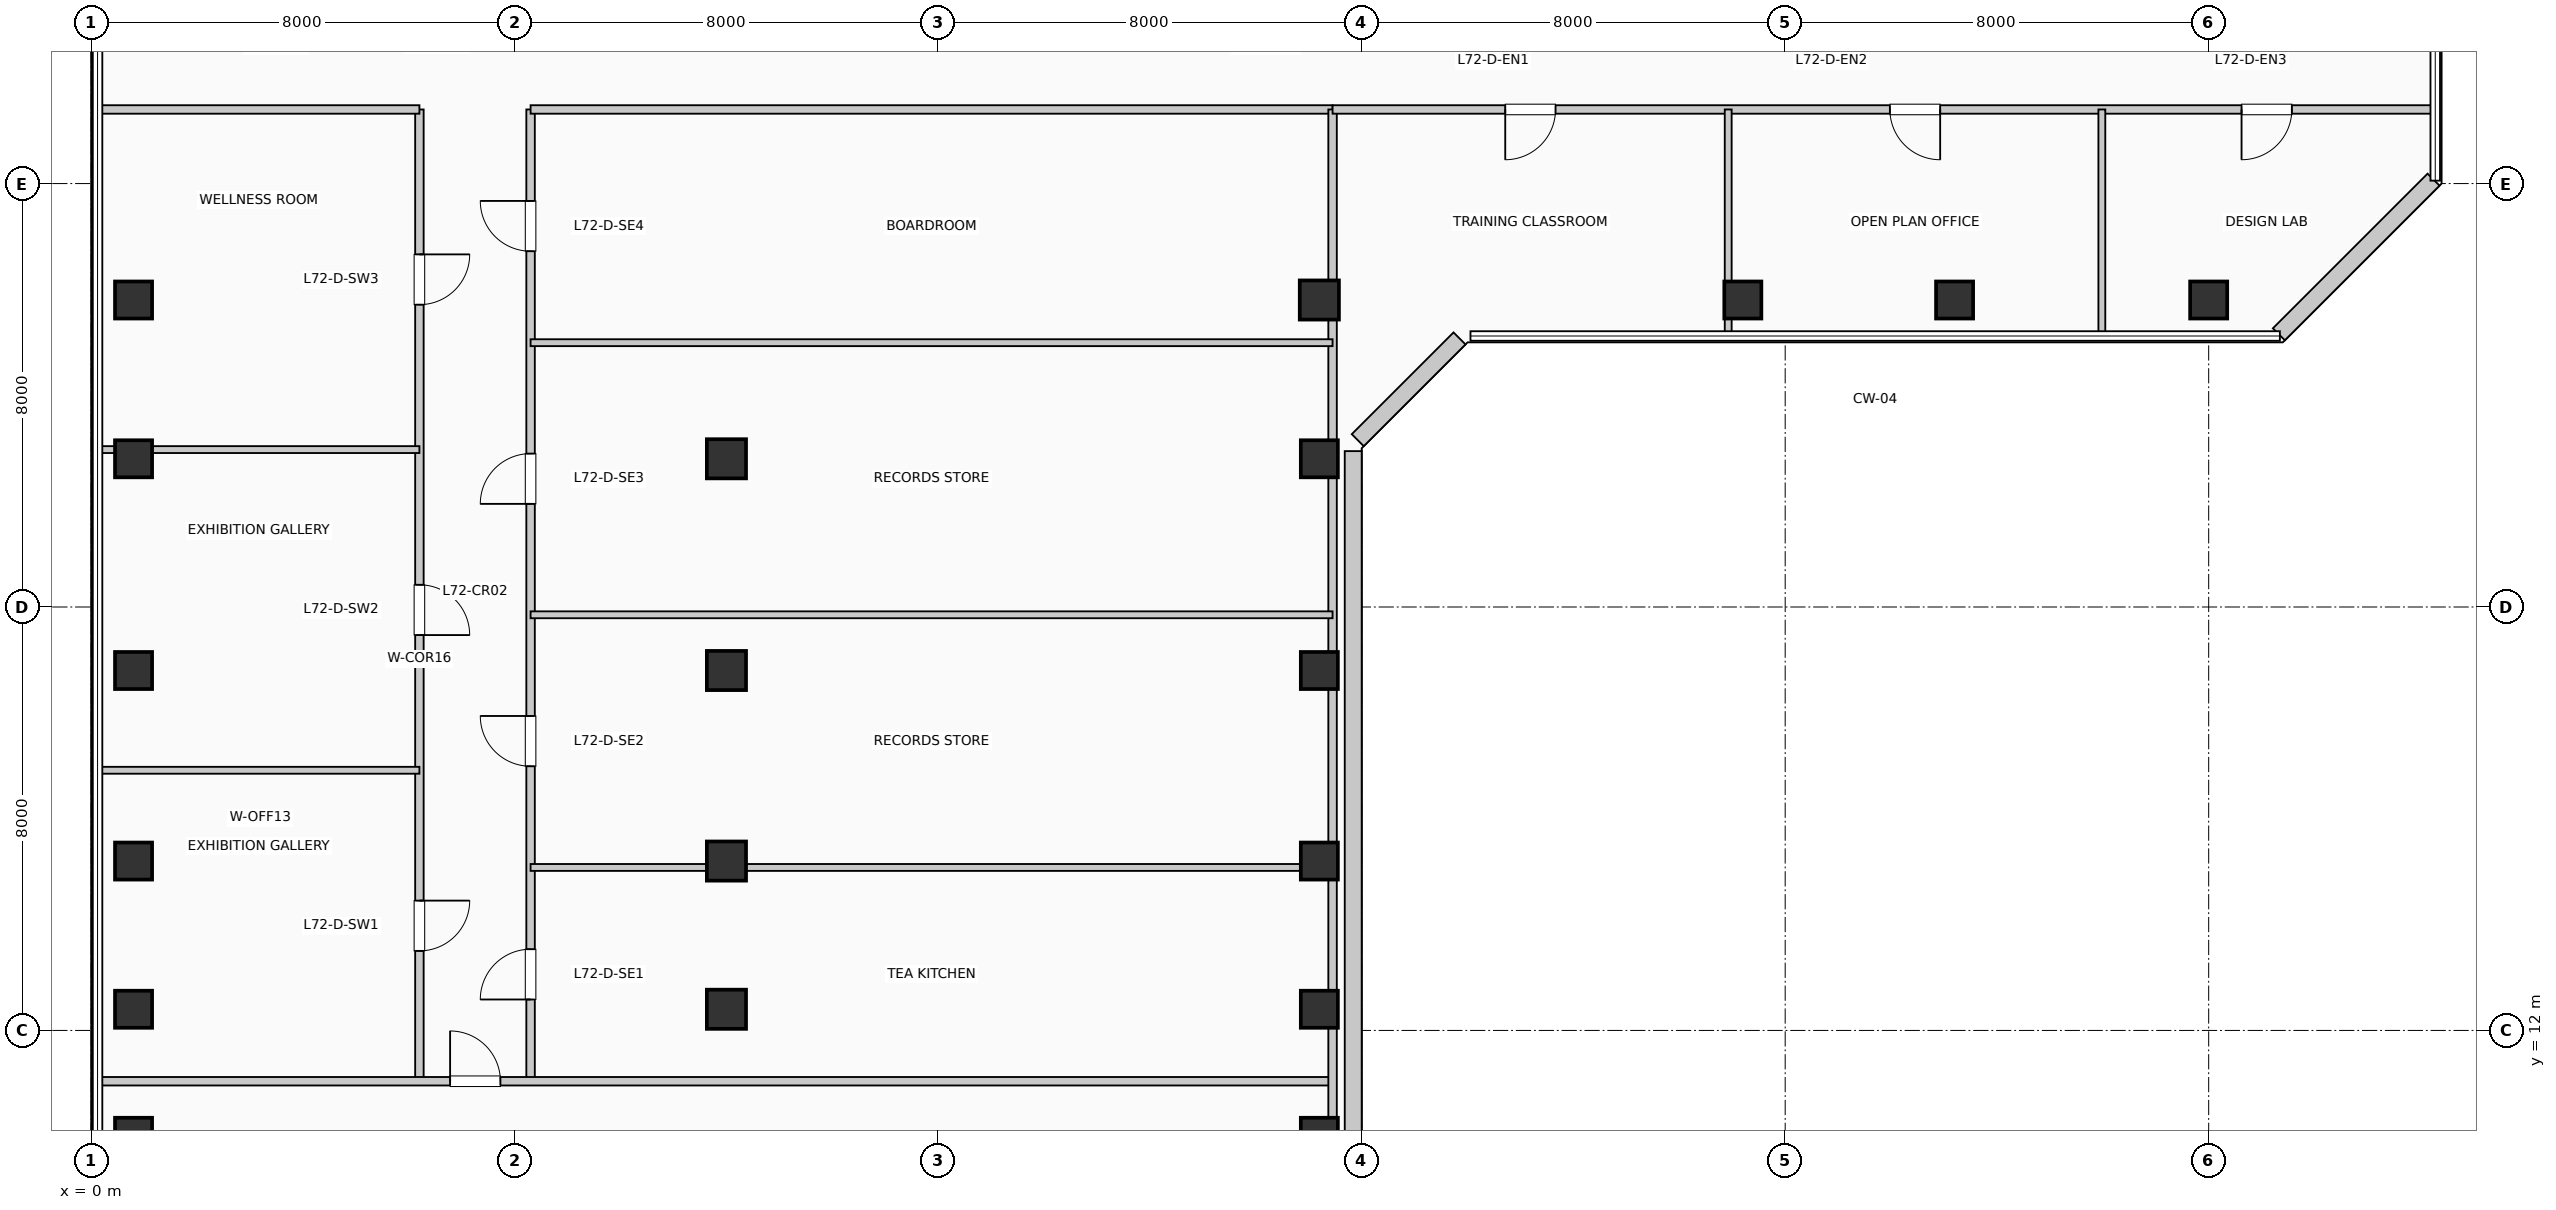
"""IFC4 building model, lengths in metres.
Left out: names, types, materials, properties, quantities, classifications, styles, units other than length and angle.
Written with IfcOpenShell. Run it as: python <this file> out.ifc"""

import sys

from ifc_helpers import new_model, si_unit, direction, frame, frame_2d, origin, origin_2d, place, context, subcontext, project, spatial, rectangle, extrude, element, fill, save


model = new_model("IFC4")
c1 = context("Model", 3, precision=1e-05, world=origin(), true_north=direction((0.0, 1.0)))
c2 = subcontext(c1, "Body", "Model", "MODEL_VIEW")
j1 = project(units=[si_unit("LENGTHUNIT", "METRE"), si_unit("PLANEANGLEUNIT", "RADIAN")], contexts=[c1])
p1 = place(None, origin())
s1 = spatial("IfcSite", under=j1, at=p1, CompositionType="ELEMENT")
p2 = place(p1, origin())
s2 = spatial("IfcBuilding", under=s1, at=p2, CompositionType="ELEMENT")
p3 = place(p2, frame((0.0, 0.0, 296.01)))
s3 = spatial("IfcBuildingStorey", under=s2, at=p3, CompositionType="ELEMENT", Elevation=296.01)
for number, where, z_axis, x_axis in (
    (1, (0.8, 10.0, 0.0), (0.0, 0.0, 1.0), (1.0, 0.0, 0.0)),
    (2, (0.8, 12.4, 0.0), (0.0, 0.0, 1.0), (1.0, 0.0, 0.0)),
    (3, (0.8, 15.2, 0.0), (0.0, 0.0, 1.0), (1.0, 0.0, 0.0)),
    (4, (0.8, 18.8, 0.0), (0.0, 0.0, 1.0), (1.0, 0.0, 0.0)),
    (5, (0.8, 22.8, 0.0), (0.0, 0.0, 1.0), (1.0, 0.0, 0.0)),
    (6, (0.8, 25.8, 0.0), (0.0, 0.0, 1.0), (1.0, 0.0, 0.0)),
):
    element("IfcColumn", number, at=place(p3, frame(where, z_axis=z_axis, x_axis=x_axis)), inside=s3, PredefinedType="COLUMN", context=c2, shape_type="SweptSolid", body=[
        extrude(rectangle(XDim=0.7, YDim=0.7, at=origin_2d()), origin(), (0.0, 0.0, 1.0), 3.96),
    ])
for number, where, z_axis, x_axis in (
    (7, (12.0, 12.4, 0.0), (0.0, 0.0, 1.0), (1.0, 0.0, 0.0)),
    (8, (12.0, 15.2, 0.0), (0.0, 0.0, 1.0), (1.0, 0.0, 0.0)),
    (9, (12.0, 18.8, 0.0), (0.0, 0.0, 1.0), (1.0, 0.0, 0.0)),
    (10, (12.0, 22.8, 0.0), (0.0, 0.0, 1.0), (1.0, 0.0, 0.0)),
):
    element("IfcColumn", number, at=place(p3, frame(where, z_axis=z_axis, x_axis=x_axis)), inside=s3, PredefinedType="COLUMN", context=c2, shape_type="SweptSolid", body=[
        extrude(rectangle(XDim=0.74, YDim=0.74, at=origin_2d()), origin(), (0.0, 0.0, 1.0), 3.96),
    ])
for number, where, z_axis, x_axis in (
    (11, (23.2, 10.0, 0.0), (0.0, 0.0, 1.0), (1.0, 0.0, 0.0)),
    (12, (23.2, 12.4, 0.0), (0.0, 0.0, 1.0), (1.0, 0.0, 0.0)),
    (13, (23.2, 15.2, 0.0), (0.0, 0.0, 1.0), (1.0, 0.0, 0.0)),
    (14, (23.2, 18.8, 0.0), (0.0, 0.0, 1.0), (1.0, 0.0, 0.0)),
    (15, (23.2, 22.8, 0.0), (0.0, 0.0, 1.0), (1.0, 0.0, 0.0)),
):
    element("IfcColumn", number, at=place(p3, frame(where, z_axis=z_axis, x_axis=x_axis)), inside=s3, PredefinedType="COLUMN", context=c2, shape_type="SweptSolid", body=[
        extrude(rectangle(XDim=0.7, YDim=0.7, at=origin_2d()), origin(), (0.0, 0.0, 1.0), 3.96),
    ])
p4 = place(p3, frame((23.2, 25.8, 0.0), z_axis=(0.0, 0.0, 1.0), x_axis=(1.0, 0.0, 0.0)))
e16 = element("IfcColumn", 16, at=p4, inside=s3, PredefinedType="COLUMN", context=c2, shape_type="SweptSolid", body=[
    extrude(rectangle(XDim=0.74, YDim=0.74, at=origin_2d()), origin(), (0.0, 0.0, 1.0), 3.96),
])
for number, where, z_axis, x_axis in (
    (17, (31.2, 25.8, 0.0), (0.0, 0.0, 1.0), (1.0, 0.0, 0.0)),
    (18, (35.2, 25.8, 0.0), (0.0, 0.0, 1.0), (1.0, 0.0, 0.0)),
    (19, (40.0, 25.8, 0.0), (0.0, 0.0, 1.0), (1.0, 0.0, 0.0)),
):
    element("IfcColumn", number, at=place(p3, frame(where, z_axis=z_axis, x_axis=x_axis)), inside=s3, PredefinedType="COLUMN", context=c2, shape_type="SweptSolid", body=[
        extrude(rectangle(XDim=0.7, YDim=0.7, at=origin_2d()), origin(), (0.0, 0.0, 1.0), 3.96),
    ])
p5 = place(p3, frame((23.84, 8.855, 0.0), z_axis=(0.0, 0.0, 1.0), x_axis=(0.0, 1.0, 0.0)))
e20 = element("IfcWall", 20, at=p5, inside=s3, PredefinedType="SOLIDWALL", context=c2, shape_type="SweptSolid", body=[
    extrude(rectangle(XDim=14.09, YDim=0.32, at=frame_2d((7.045, 0.0))), origin(), (0.0, 0.0, 1.0), 3.74),
])
p6 = place(p3, frame((23.926, 23.152, 0.0), z_axis=(0.0, 0.0, 1.0), x_axis=(0.707106781187, 0.707106781187, 0.0)))
e21 = element("IfcWall", 21, at=p6, inside=s3, PredefinedType="SOLIDWALL", context=c2, shape_type="SweptSolid", body=[
    extrude(rectangle(XDim=2.718, YDim=0.32, at=frame_2d((1.359, 0.0))), origin(), (0.0, 0.0, 1.0), 3.74),
])
p7 = place(p3, frame((41.326, 25.152, 0.0), z_axis=(0.0, 0.0, 1.0), x_axis=(0.707136318428, 0.707077242712, 0.0)))
e22 = element("IfcWall", 22, at=p7, inside=s3, PredefinedType="SOLIDWALL", context=c2, shape_type="SweptSolid", body=[
    extrude(rectangle(XDim=4.133, YDim=0.32, at=frame_2d((2.066, 0.0))), origin(), (0.0, 0.0, 1.0), 3.74),
])
p8 = place(p3, frame((6.2, 11.04, 0.0), z_axis=(0.0, 0.0, 1.0), x_axis=(0.0, 1.0, 0.0)))
e23 = element("IfcWall", 23, at=p8, inside=s3, PredefinedType="PARTITIONING", context=c2, shape_type="SweptSolid", body=[
    extrude(rectangle(XDim=18.36, YDim=0.16, at=frame_2d((9.18, 0.0))), origin(), (0.0, 0.0, 1.0), 3.74),
])
p9 = place(p8, frame((3.413, 0.0, 0.0), z_axis=(0.0, 0.0, 1.0), x_axis=(-1.0, 0.0, 0.0)))
e24 = element("IfcOpeningElement", 24, at=p9, cuts=e23, PredefinedType="OPENING", context=c2, shape_type="SweptSolid", body=[
    extrude(rectangle(XDim=0.95, YDim=2.15, at=frame_2d((0.475, 1.075))), frame((0.0, 0.09, 0.0), z_axis=(0.0, -1.0, 0.0), x_axis=(1.0, 0.0, 0.0)), (0.0, 0.0, 1.0), 0.18),
])
p10 = place(p8, frame((9.38, 0.0, 0.0), z_axis=(0.0, 0.0, 1.0), x_axis=(-1.0, 0.0, 0.0)))
e25 = element("IfcOpeningElement", 25, at=p10, cuts=e23, PredefinedType="OPENING", context=c2, shape_type="SweptSolid", body=[
    extrude(rectangle(XDim=0.95, YDim=2.15, at=frame_2d((0.475, 1.075))), frame((0.0, 0.09, 0.0), z_axis=(0.0, -1.0, 0.0), x_axis=(1.0, 0.0, 0.0)), (0.0, 0.0, 1.0), 0.18),
])
p11 = place(p8, frame((15.622, 0.0, 0.0), z_axis=(0.0, 0.0, 1.0), x_axis=(-1.0, 0.0, 0.0)))
e26 = element("IfcOpeningElement", 26, at=p11, cuts=e23, PredefinedType="OPENING", context=c2, shape_type="SweptSolid", body=[
    extrude(rectangle(XDim=0.95, YDim=2.15, at=frame_2d((0.475, 1.075))), frame((0.0, 0.09, 0.0), z_axis=(0.0, -1.0, 0.0), x_axis=(1.0, 0.0, 0.0)), (0.0, 0.0, 1.0), 0.18),
])
p12 = place(p3, frame((8.3, 11.04, 0.0), z_axis=(0.0, 0.0, 1.0), x_axis=(0.0, 1.0, 0.0)))
e27 = element("IfcWall", 27, at=p12, inside=s3, PredefinedType="PARTITIONING", context=c2, shape_type="SweptSolid", body=[
    extrude(rectangle(XDim=18.36, YDim=0.16, at=frame_2d((9.18, 0.0))), origin(), (0.0, 0.0, 1.0), 3.74),
])
p13 = place(p12, frame((1.545, 0.0, 0.0)))
e28 = element("IfcOpeningElement", 28, at=p13, cuts=e27, PredefinedType="OPENING", context=c2, shape_type="SweptSolid", body=[
    extrude(rectangle(XDim=0.95, YDim=2.15, at=frame_2d((0.475, 1.075))), frame((0.0, 0.09, 0.0), z_axis=(0.0, -1.0, 0.0), x_axis=(1.0, 0.0, 0.0)), (0.0, 0.0, 1.0), 0.18),
])
p14 = place(p12, frame((5.951, 0.0, 0.0)))
e29 = element("IfcOpeningElement", 29, at=p14, cuts=e27, PredefinedType="OPENING", context=c2, shape_type="SweptSolid", body=[
    extrude(rectangle(XDim=0.95, YDim=2.15, at=frame_2d((0.475, 1.075))), frame((0.0, 0.09, 0.0), z_axis=(0.0, -1.0, 0.0), x_axis=(1.0, 0.0, 0.0)), (0.0, 0.0, 1.0), 0.18),
])
p15 = place(p12, frame((10.908, 0.0, 0.0)))
e30 = element("IfcOpeningElement", 30, at=p15, cuts=e27, PredefinedType="OPENING", context=c2, shape_type="SweptSolid", body=[
    extrude(rectangle(XDim=0.95, YDim=2.15, at=frame_2d((0.475, 1.075))), frame((0.0, 0.09, 0.0), z_axis=(0.0, -1.0, 0.0), x_axis=(1.0, 0.0, 0.0)), (0.0, 0.0, 1.0), 0.18),
])
p16 = place(p12, frame((15.682, 0.0, 0.0)))
e31 = element("IfcOpeningElement", 31, at=p16, cuts=e27, PredefinedType="OPENING", context=c2, shape_type="SweptSolid", body=[
    extrude(rectangle(XDim=0.95, YDim=2.15, at=frame_2d((0.475, 1.075))), frame((0.0, 0.09, 0.0), z_axis=(0.0, -1.0, 0.0), x_axis=(1.0, 0.0, 0.0)), (0.0, 0.0, 1.0), 0.18),
])
p17 = place(p3, frame((0.19, 11.04, 0.0), z_axis=(0.0, 0.0, 1.0), x_axis=(1.0, 0.0, 0.0)))
e32 = element("IfcWall", 32, at=p17, inside=s3, PredefinedType="PARTITIONING", context=c2, shape_type="SweptSolid", body=[
    extrude(rectangle(XDim=23.26, YDim=0.16, at=frame_2d((11.63, 0.0))), origin(), (0.0, 0.0, 1.0), 3.74),
])
p18 = place(p17, frame((6.59, 0.0, 0.0)))
e33 = element("IfcOpeningElement", 33, at=p18, cuts=e32, PredefinedType="OPENING", context=c2, shape_type="SweptSolid", body=[
    extrude(rectangle(XDim=0.95, YDim=2.15, at=frame_2d((0.475, 1.075))), frame((0.0, 0.09, 0.0), z_axis=(0.0, -1.0, 0.0), x_axis=(1.0, 0.0, 0.0)), (0.0, 0.0, 1.0), 0.18),
])
p19 = place(p3, frame((0.19, 29.4, 0.0), z_axis=(0.0, 0.0, 1.0), x_axis=(1.0, 0.0, 0.0)))
e34 = element("IfcWall", 34, at=p19, inside=s3, PredefinedType="PARTITIONING", context=c2, shape_type="SweptSolid", body=[
    extrude(rectangle(XDim=6.01, YDim=0.16, at=frame_2d((3.005, 0.0))), origin(), (0.0, 0.0, 1.0), 3.425),
])
p20 = place(p3, frame((8.3, 29.4, 0.0), z_axis=(0.0, 0.0, 1.0), x_axis=(1.0, 0.0, 0.0)))
e35 = element("IfcWall", 35, at=p20, inside=s3, PredefinedType="PARTITIONING", context=c2, shape_type="SweptSolid", body=[
    extrude(rectangle(XDim=15.15, YDim=0.16, at=frame_2d((7.575, 0.0))), origin(), (0.0, 0.0, 1.0), 3.425),
])
p21 = place(p3, frame((23.45, 6.84, 0.0), z_axis=(0.0, 0.0, 1.0), x_axis=(0.0, 1.0, 0.0)))
e36 = element("IfcWall", 36, at=p21, inside=s3, PredefinedType="PARTITIONING", context=c2, shape_type="SweptSolid", body=[
    extrude(rectangle(XDim=22.56, YDim=0.16, at=frame_2d((11.28, 0.0))), origin(), (0.0, 0.0, 1.0), 3.175),
])
p22 = place(p3, frame((0.19, 16.915, 0.0), z_axis=(0.0, 0.0, 1.0), x_axis=(1.0, 0.0, 0.0)))
e37 = element("IfcWall", 37, at=p22, inside=s3, PredefinedType="PARTITIONING", context=c2, shape_type="SweptSolid", body=[
    extrude(rectangle(XDim=6.01, YDim=0.13, at=frame_2d((3.005, 0.0))), origin(), (0.0, 0.0, 1.0), 3.74),
])
p23 = place(p3, frame((0.19, 22.974, 0.0), z_axis=(0.0, 0.0, 1.0), x_axis=(1.0, 0.0, 0.0)))
e38 = element("IfcWall", 38, at=p23, inside=s3, PredefinedType="PARTITIONING", context=c2, shape_type="SweptSolid", body=[
    extrude(rectangle(XDim=6.01, YDim=0.13, at=frame_2d((3.005, 0.0))), origin(), (0.0, 0.0, 1.0), 3.175),
])
p24 = place(p3, frame((8.3, 15.079, 0.0), z_axis=(0.0, 0.0, 1.0), x_axis=(1.0, 0.0, 0.0)))
e39 = element("IfcWall", 39, at=p24, inside=s3, PredefinedType="PARTITIONING", context=c2, shape_type="SweptSolid", body=[
    extrude(rectangle(XDim=15.15, YDim=0.13, at=frame_2d((7.575, 0.0))), origin(), (0.0, 0.0, 1.0), 3.175),
])
for number, where, z_axis, x_axis in (
    (40, (8.3, 19.853, 0.0), (0.0, 0.0, 1.0), (1.0, 0.0, 0.0)),
    (41, (8.3, 24.994, 0.0), (0.0, 0.0, 1.0), (1.0, 0.0, 0.0)),
):
    element("IfcWall", number, at=place(p3, frame(where, z_axis=z_axis, x_axis=x_axis)), inside=s3, PredefinedType="PARTITIONING", context=c2, shape_type="SweptSolid", body=[
        extrude(rectangle(XDim=15.15, YDim=0.13, at=frame_2d((7.575, 0.0))), origin(), (0.0, 0.0, 1.0), 3.74),
    ])
p25 = place(p3, frame((23.45, 29.4, 0.0), z_axis=(0.0, 0.0, 1.0), x_axis=(1.0, 0.0, 0.0)))
e42 = element("IfcWall", 42, at=p25, inside=s3, PredefinedType="PARTITIONING", context=c2, shape_type="SweptSolid", body=[
    extrude(rectangle(XDim=20.76, YDim=0.16, at=frame_2d((10.38, 0.0))), origin(), (0.0, 0.0, 1.0), 3.425),
])
p26 = place(p25, frame((4.212, 0.0, 0.0), z_axis=(0.0, 0.0, 1.0), x_axis=(-1.0, 0.0, 0.0)))
e43 = element("IfcOpeningElement", 43, at=p26, cuts=e42, PredefinedType="OPENING", context=c2, shape_type="SweptSolid", body=[
    extrude(rectangle(XDim=0.95, YDim=2.15, at=frame_2d((0.475, 1.075))), frame((0.0, 0.09, 0.0), z_axis=(0.0, -1.0, 0.0), x_axis=(1.0, 0.0, 0.0)), (0.0, 0.0, 1.0), 0.18),
])
p27 = place(p25, frame((11.478, 0.0, 0.0), z_axis=(0.0, 0.0, 1.0), x_axis=(-1.0, 0.0, 0.0)))
e44 = element("IfcOpeningElement", 44, at=p27, cuts=e42, PredefinedType="OPENING", context=c2, shape_type="SweptSolid", body=[
    extrude(rectangle(XDim=0.95, YDim=2.15, at=frame_2d((0.475, 1.075))), frame((0.0, 0.09, 0.0), z_axis=(0.0, -1.0, 0.0), x_axis=(1.0, 0.0, 0.0)), (0.0, 0.0, 1.0), 0.18),
])
p28 = place(p25, frame((18.121, 0.0, 0.0), z_axis=(0.0, 0.0, 1.0), x_axis=(-1.0, 0.0, 0.0)))
e45 = element("IfcOpeningElement", 45, at=p28, cuts=e42, PredefinedType="OPENING", context=c2, shape_type="SweptSolid", body=[
    extrude(rectangle(XDim=0.95, YDim=2.15, at=frame_2d((0.475, 1.075))), frame((0.0, 0.09, 0.0), z_axis=(0.0, -1.0, 0.0), x_axis=(1.0, 0.0, 0.0)), (0.0, 0.0, 1.0), 0.18),
])
p29 = place(p3, frame((30.924, 25.19, 0.0), z_axis=(0.0, 0.0, 1.0), x_axis=(0.0, 1.0, 0.0)))
e46 = element("IfcWall", 46, at=p29, inside=s3, PredefinedType="PARTITIONING", context=c2, shape_type="SweptSolid", body=[
    extrude(rectangle(XDim=4.21, YDim=0.13, at=frame_2d((2.105, 0.0))), origin(), (0.0, 0.0, 1.0), 3.175),
])
p30 = place(p3, frame((37.982, 25.19, 0.0), z_axis=(0.0, 0.0, 1.0), x_axis=(0.0, 1.0, 0.0)))
e47 = element("IfcWall", 47, at=p30, inside=s3, PredefinedType="PARTITIONING", context=c2, shape_type="SweptSolid", body=[
    extrude(rectangle(XDim=4.21, YDim=0.13, at=frame_2d((2.105, 0.0))), origin(), (0.0, 0.0, 1.0), 3.74),
])
p31 = place(p18, origin())
e48 = element("IfcDoor", 48, at=p31, inside=s3, OperationType="SINGLE_SWING_LEFT", PredefinedType="DOOR", context=c2, shape_type="SweptSolid", body=[
    extrude(rectangle(XDim=0.95, YDim=2.15, at=frame_2d((0.475, 1.075))), frame((0.0, 0.025, 0.0), z_axis=(0.0, -1.0, 0.0), x_axis=(1.0, 0.0, 0.0)), (0.0, 0.0, 1.0), 0.05),
])
fill(e33, e48)
p32 = place(p9, origin())
e49 = element("IfcDoor", 49, at=p32, inside=s3, OperationType="SINGLE_SWING_RIGHT", PredefinedType="DOOR", context=c2, shape_type="SweptSolid", body=[
    extrude(rectangle(XDim=0.95, YDim=2.15, at=frame_2d((0.475, 1.075))), frame((0.0, 0.025, 0.0), z_axis=(0.0, -1.0, 0.0), x_axis=(1.0, 0.0, 0.0)), (0.0, 0.0, 1.0), 0.05),
])
fill(e24, e49)
p33 = place(p10, origin())
e50 = element("IfcDoor", 50, at=p33, inside=s3, OperationType="SINGLE_SWING_LEFT", PredefinedType="DOOR", context=c2, shape_type="SweptSolid", body=[
    extrude(rectangle(XDim=0.95, YDim=2.15, at=frame_2d((0.475, 1.075))), frame((0.0, 0.025, 0.0), z_axis=(0.0, -1.0, 0.0), x_axis=(1.0, 0.0, 0.0)), (0.0, 0.0, 1.0), 0.05),
])
fill(e25, e50)
p34 = place(p11, origin())
e51 = element("IfcDoor", 51, at=p34, inside=s3, OperationType="SINGLE_SWING_RIGHT", PredefinedType="DOOR", context=c2, shape_type="SweptSolid", body=[
    extrude(rectangle(XDim=0.95, YDim=2.15, at=frame_2d((0.475, 1.075))), frame((0.0, 0.025, 0.0), z_axis=(0.0, -1.0, 0.0), x_axis=(1.0, 0.0, 0.0)), (0.0, 0.0, 1.0), 0.05),
])
fill(e26, e51)
p35 = place(p13, origin())
e52 = element("IfcDoor", 52, at=p35, inside=s3, OperationType="SINGLE_SWING_LEFT", PredefinedType="DOOR", context=c2, shape_type="SweptSolid", body=[
    extrude(rectangle(XDim=0.95, YDim=2.15, at=frame_2d((0.475, 1.075))), frame((0.0, 0.025, 0.0), z_axis=(0.0, -1.0, 0.0), x_axis=(1.0, 0.0, 0.0)), (0.0, 0.0, 1.0), 0.05),
])
fill(e28, e52)
p36 = place(p14, origin())
e53 = element("IfcDoor", 53, at=p36, inside=s3, OperationType="SINGLE_SWING_RIGHT", PredefinedType="DOOR", context=c2, shape_type="SweptSolid", body=[
    extrude(rectangle(XDim=0.95, YDim=2.15, at=frame_2d((0.475, 1.075))), frame((0.0, 0.025, 0.0), z_axis=(0.0, -1.0, 0.0), x_axis=(1.0, 0.0, 0.0)), (0.0, 0.0, 1.0), 0.05),
])
fill(e29, e53)
p37 = place(p15, origin())
e54 = element("IfcDoor", 54, at=p37, inside=s3, OperationType="SINGLE_SWING_LEFT", PredefinedType="DOOR", context=c2, shape_type="SweptSolid", body=[
    extrude(rectangle(XDim=0.95, YDim=2.15, at=frame_2d((0.475, 1.075))), frame((0.0, 0.025, 0.0), z_axis=(0.0, -1.0, 0.0), x_axis=(1.0, 0.0, 0.0)), (0.0, 0.0, 1.0), 0.05),
])
fill(e30, e54)
p38 = place(p16, origin())
e55 = element("IfcDoor", 55, at=p38, inside=s3, OperationType="SINGLE_SWING_RIGHT", PredefinedType="DOOR", context=c2, shape_type="SweptSolid", body=[
    extrude(rectangle(XDim=0.95, YDim=2.15, at=frame_2d((0.475, 1.075))), frame((0.0, 0.025, 0.0), z_axis=(0.0, -1.0, 0.0), x_axis=(1.0, 0.0, 0.0)), (0.0, 0.0, 1.0), 0.05),
])
fill(e31, e55)
p39 = place(p26, origin())
e56 = element("IfcDoor", 56, at=p39, inside=s3, OperationType="SINGLE_SWING_LEFT", PredefinedType="DOOR", context=c2, shape_type="SweptSolid", body=[
    extrude(rectangle(XDim=0.95, YDim=2.15, at=frame_2d((0.475, 1.075))), frame((0.0, 0.025, 0.0), z_axis=(0.0, -1.0, 0.0), x_axis=(1.0, 0.0, 0.0)), (0.0, 0.0, 1.0), 0.05),
])
fill(e43, e56)
p40 = place(p27, origin())
e57 = element("IfcDoor", 57, at=p40, inside=s3, OperationType="SINGLE_SWING_RIGHT", PredefinedType="DOOR", context=c2, shape_type="SweptSolid", body=[
    extrude(rectangle(XDim=0.95, YDim=2.15, at=frame_2d((0.475, 1.075))), frame((0.0, 0.025, 0.0), z_axis=(0.0, -1.0, 0.0), x_axis=(1.0, 0.0, 0.0)), (0.0, 0.0, 1.0), 0.05),
])
fill(e44, e57)
p41 = place(p28, origin())
e58 = element("IfcDoor", 58, at=p41, inside=s3, OperationType="SINGLE_SWING_LEFT", PredefinedType="DOOR", context=c2, shape_type="SweptSolid", body=[
    extrude(rectangle(XDim=0.95, YDim=2.15, at=frame_2d((0.475, 1.075))), frame((0.0, 0.025, 0.0), z_axis=(0.0, -1.0, 0.0), x_axis=(1.0, 0.0, 0.0)), (0.0, 0.0, 1.0), 0.05),
])
fill(e45, e58)
save(model, sys.argv[1])
